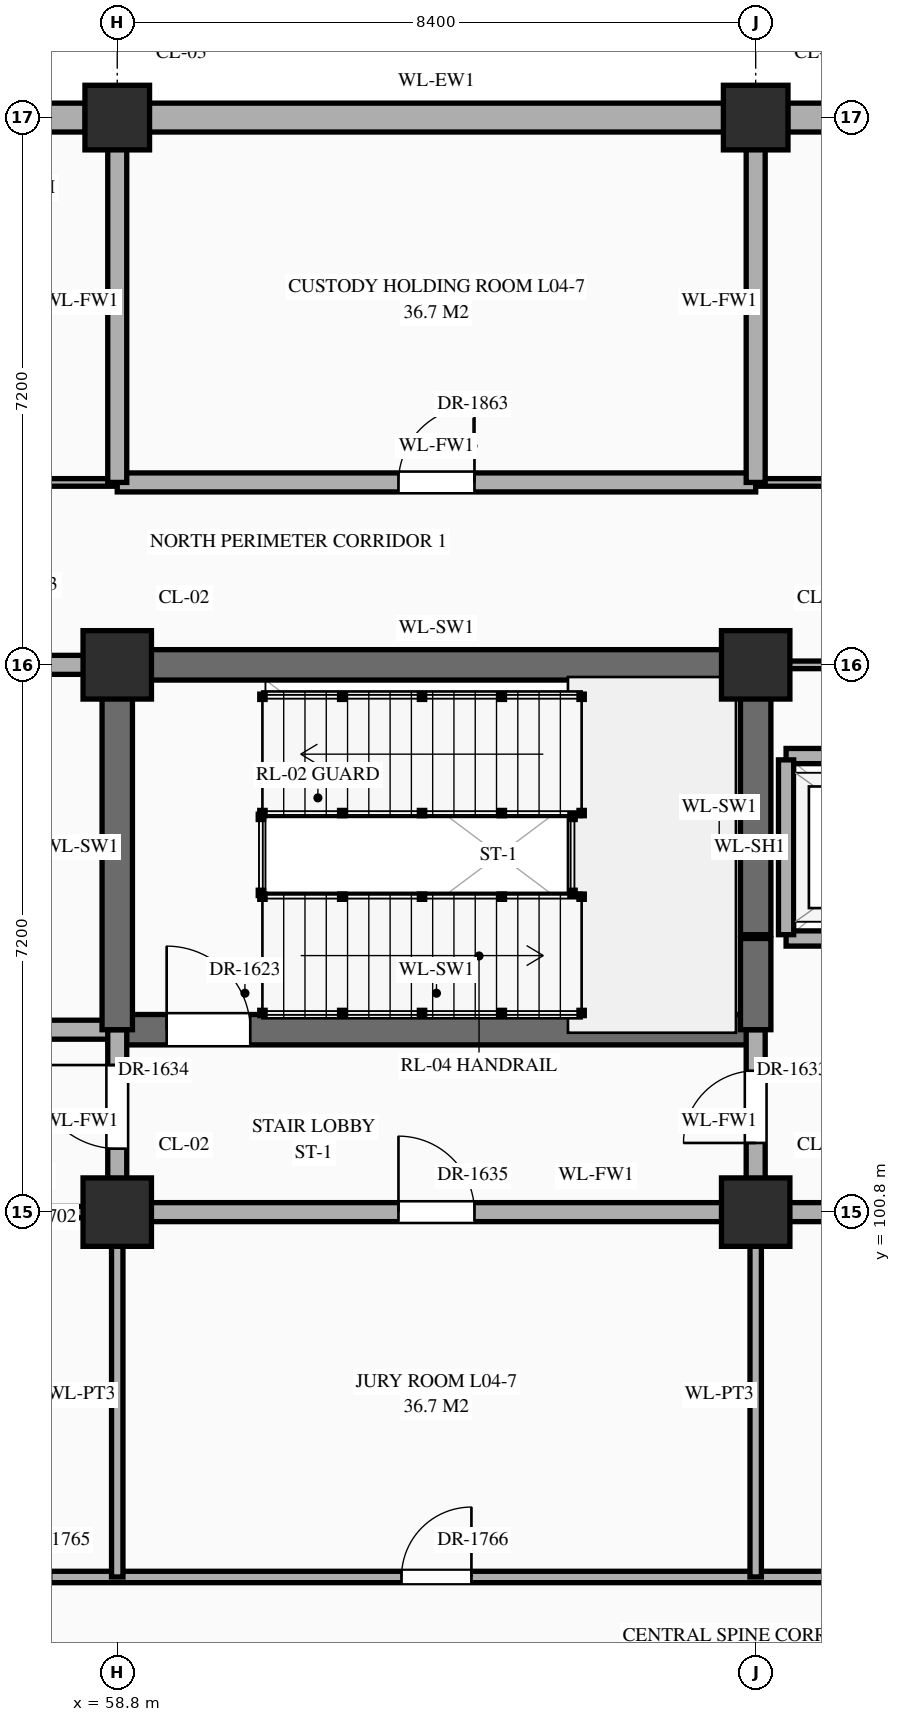
"""IFC4 building model, lengths in metres.
Left out: names, types, materials, properties, quantities, classifications, styles, units other than length and angle.
Written with IfcOpenShell. Run it as: python <this file> out.ifc"""

import sys

from ifc_helpers import new_model, si_unit, direction, frame, frame_2d, origin, origin_2d, place, context, subcontext, project, spatial, rectangle, extrude, element, fill, save


model = new_model("IFC4")
c1 = context("Model", 3, precision=1e-05, world=origin(), true_north=direction((0.0, 1.0)))
c2 = subcontext(c1, "Body", "Model", "MODEL_VIEW")
j1 = project(units=[si_unit("LENGTHUNIT", "METRE"), si_unit("PLANEANGLEUNIT", "RADIAN")], contexts=[c1])
p1 = place(None, origin())
s1 = spatial("IfcSite", under=j1, at=p1, CompositionType="ELEMENT")
p2 = place(p1, origin())
s2 = spatial("IfcBuilding", under=s1, at=p2, CompositionType="ELEMENT")
p3 = place(p2, frame((0.0, 0.0, 16.2)))
s3 = spatial("IfcBuildingStorey", under=s2, at=p3, CompositionType="ELEMENT", Elevation=16.2)
for number, where, z_axis, x_axis in (
    (1, (58.8, 100.8, 0.0), (0.0, 0.0, 1.0), (1.0, 0.0, 0.0)),
    (2, (58.8, 108.0, 0.0), (0.0, 0.0, 1.0), (1.0, 0.0, 0.0)),
):
    element("IfcColumn", number, at=place(p3, frame(where, z_axis=z_axis, x_axis=x_axis)), inside=s3, PredefinedType="COLUMN", context=c2, shape_type="SweptSolid", body=[
        extrude(rectangle(XDim=0.9, YDim=0.9, at=origin_2d()), origin(), (0.0, 0.0, 1.0), 5.4),
    ])
p4 = place(p3, frame((58.8, 115.2, 0.0), z_axis=(0.0, 0.0, 1.0), x_axis=(1.0, 0.0, 0.0)))
e3 = element("IfcColumn", 3, at=p4, inside=s3, PredefinedType="COLUMN", context=c2, shape_type="SweptSolid", body=[
    extrude(rectangle(XDim=0.85, YDim=0.85, at=origin_2d()), origin(), (0.0, 0.0, 1.0), 5.4),
])
for number, where, z_axis, x_axis in (
    (4, (67.2, 100.8, 0.0), (0.0, 0.0, 1.0), (1.0, 0.0, 0.0)),
    (5, (67.2, 108.0, 0.0), (0.0, 0.0, 1.0), (1.0, 0.0, 0.0)),
):
    element("IfcColumn", number, at=place(p3, frame(where, z_axis=z_axis, x_axis=x_axis)), inside=s3, PredefinedType="COLUMN", context=c2, shape_type="SweptSolid", body=[
        extrude(rectangle(XDim=0.9, YDim=0.9, at=origin_2d()), origin(), (0.0, 0.0, 1.0), 5.4),
    ])
p5 = place(p3, frame((67.2, 115.2, 0.0), z_axis=(0.0, 0.0, 1.0), x_axis=(1.0, 0.0, 0.0)))
e6 = element("IfcColumn", 6, at=p5, inside=s3, PredefinedType="COLUMN", context=c2, shape_type="SweptSolid", body=[
    extrude(rectangle(XDim=0.85, YDim=0.85, at=origin_2d()), origin(), (0.0, 0.0, 1.0), 5.4),
])
p6 = place(p3, frame((50.82, 115.2, 0.0), z_axis=(0.0, 0.0, 1.0), x_axis=(1.0, 0.0, 0.0)))
e7 = element("IfcWall", 7, at=p6, inside=s3, PredefinedType="STANDARD", context=c2, shape_type="SweptSolid", body=[
    extrude(rectangle(XDim=7.56, YDim=0.38, at=frame_2d((3.78, 0.0))), origin(), (0.0, 0.0, 1.0), 4.47),
])
p7 = place(p3, frame((59.22, 115.2, 0.0), z_axis=(0.0, 0.0, 1.0), x_axis=(1.0, 0.0, 0.0)))
e8 = element("IfcWall", 8, at=p7, inside=s3, PredefinedType="STANDARD", context=c2, shape_type="SweptSolid", body=[
    extrude(rectangle(XDim=7.56, YDim=0.38, at=frame_2d((3.78, 0.0))), origin(), (0.0, 0.0, 1.0), 4.47),
])
p8 = place(p3, frame((67.62, 115.2, 0.0), z_axis=(0.0, 0.0, 1.0), x_axis=(1.0, 0.0, 0.0)))
e9 = element("IfcWall", 9, at=p8, inside=s3, PredefinedType="STANDARD", context=c2, shape_type="SweptSolid", body=[
    extrude(rectangle(XDim=7.56, YDim=0.38, at=frame_2d((3.78, 0.0))), origin(), (0.0, 0.0, 1.0), 4.47),
])
p9 = place(p3, frame((56.2, 96.0, 0.0), z_axis=(0.0, 0.0, 1.0), x_axis=(1.0, 0.0, 0.0)))
e10 = element("IfcWall", 10, at=p9, inside=s3, PredefinedType="STANDARD", context=c2, shape_type="SweptSolid", body=[
    extrude(rectangle(XDim=27.8, YDim=0.15, at=frame_2d((13.9, 0.0))), origin(), (0.0, 0.0, 1.0), 5.12),
])
p10 = place(p9, frame((0.87, 0.0, 0.0)))
e11 = element("IfcOpeningElement", 11, at=p10, cuts=e10, PredefinedType="OPENING", context=c2, shape_type="SweptSolid", body=[
    extrude(rectangle(XDim=0.86, YDim=2.1, at=frame_2d((0.43, 1.05))), frame((0.0, 0.087, 0.0), z_axis=(0.0, -1.0, 0.0), x_axis=(1.0, 0.0, 0.0)), (0.0, 0.0, 1.0), 0.174),
])
p11 = place(p9, frame((6.34, 0.0, 0.0)))
e12 = element("IfcOpeningElement", 12, at=p11, cuts=e10, PredefinedType="OPENING", context=c2, shape_type="SweptSolid", body=[
    extrude(rectangle(XDim=0.92, YDim=2.15, at=frame_2d((0.46, 1.075))), frame((0.0, 0.087, 0.0), z_axis=(0.0, -1.0, 0.0), x_axis=(1.0, 0.0, 0.0)), (0.0, 0.0, 1.0), 0.174),
])
p12 = place(p9, frame((14.72, 0.0, 0.0)))
e13 = element("IfcOpeningElement", 13, at=p12, cuts=e10, PredefinedType="OPENING", context=c2, shape_type="SweptSolid", body=[
    extrude(rectangle(XDim=0.96, YDim=2.2, at=frame_2d((0.48, 1.1))), frame((0.0, 0.087, 0.0), z_axis=(0.0, -1.0, 0.0), x_axis=(1.0, 0.0, 0.0)), (0.0, 0.0, 1.0), 0.174),
])
p13 = place(p9, frame((23.1, 0.0, 0.0)))
e14 = element("IfcOpeningElement", 14, at=p13, cuts=e10, PredefinedType="OPENING", context=c2, shape_type="SweptSolid", body=[
    extrude(rectangle(XDim=1.0, YDim=2.25, at=frame_2d((0.5, 1.125))), frame((0.0, 0.087, 0.0), z_axis=(0.0, -1.0, 0.0), x_axis=(1.0, 0.0, 0.0)), (0.0, 0.0, 1.0), 0.174),
])
p14 = place(p3, frame((56.2, 100.8, 0.0), z_axis=(0.0, 0.0, 1.0), x_axis=(1.0, 0.0, 0.0)))
e15 = element("IfcWall", 15, at=p14, inside=s3, PredefinedType="STANDARD", context=c2, shape_type="SweptSolid", body=[
    extrude(rectangle(XDim=2.6, YDim=0.15, at=frame_2d((1.3, 0.0))), origin(), (0.0, 0.0, 1.0), 4.27),
])
p15 = place(p14, frame((0.575, 0.0, 0.0)))
e16 = element("IfcOpeningElement", 16, at=p15, cuts=e15, PredefinedType="OPENING", context=c2, shape_type="SweptSolid", body=[
    extrude(rectangle(XDim=1.08, YDim=2.25, at=frame_2d((0.54, 1.125))), frame((0.0, 0.087, 0.0), z_axis=(0.0, -1.0, 0.0), x_axis=(1.0, 0.0, 0.0)), (0.0, 0.0, 1.0), 0.174),
])
p16 = place(p3, frame((58.8, 100.8, 0.0), z_axis=(0.0, 0.0, 1.0), x_axis=(1.0, 0.0, 0.0)))
e17 = element("IfcWall", 17, at=p16, inside=s3, PredefinedType="STANDARD", context=c2, shape_type="SweptSolid", body=[
    extrude(rectangle(XDim=12.6, YDim=0.25, at=frame_2d((6.3, 0.0))), origin(), (0.0, 0.0, 1.0), 4.27),
])
p17 = place(p16, frame((3.7, 0.0, 0.0)))
e18 = element("IfcOpeningElement", 18, at=p17, cuts=e17, PredefinedType="OPENING", context=c2, shape_type="SweptSolid", body=[
    extrude(rectangle(XDim=1.0, YDim=2.2, at=frame_2d((0.5, 1.1))), frame((0.0, 0.137, 0.0), z_axis=(0.0, -1.0, 0.0), x_axis=(1.0, 0.0, 0.0)), (0.0, 0.0, 1.0), 0.274),
])
p18 = place(p3, frame((54.6, 103.2, 0.0), z_axis=(0.0, 0.0, 1.0), x_axis=(1.0, 0.0, 0.0)))
e19 = element("IfcWall", 19, at=p18, inside=s3, PredefinedType="STANDARD", context=c2, shape_type="SweptSolid", body=[
    extrude(rectangle(XDim=4.2, YDim=0.25, at=frame_2d((2.1, 0.0))), origin(), (0.0, 0.0, 1.0), 5.12),
])
p19 = place(p18, frame((1.55, 0.0, 0.0)))
e20 = element("IfcOpeningElement", 20, at=p19, cuts=e19, PredefinedType="OPENING", context=c2, shape_type="SweptSolid", body=[
    extrude(rectangle(XDim=1.1, YDim=2.2, at=frame_2d((0.55, 1.1))), frame((0.0, 0.137, 0.0), z_axis=(0.0, -1.0, 0.0), x_axis=(1.0, 0.0, 0.0)), (0.0, 0.0, 1.0), 0.274),
])
p20 = place(p3, frame((58.8, 103.2, 0.0), z_axis=(0.0, 0.0, 1.0), x_axis=(1.0, 0.0, 0.0)))
e21 = element("IfcWall", 21, at=p20, inside=s3, PredefinedType="SHEAR", context=c2, shape_type="SweptSolid", body=[
    extrude(rectangle(XDim=8.4, YDim=0.4, at=frame_2d((4.2, 0.0))), origin(), (0.0, 0.0, 1.0), 5.12),
])
p21 = place(p20, frame((0.65, 0.0, 0.0)))
e22 = element("IfcOpeningElement", 22, at=p21, cuts=e21, PredefinedType="OPENING", context=c2, shape_type="SweptSolid", body=[
    extrude(rectangle(XDim=1.1, YDim=2.2, at=frame_2d((0.55, 1.1))), frame((0.0, 0.212, 0.0), z_axis=(0.0, -1.0, 0.0), x_axis=(1.0, 0.0, 0.0)), (0.0, 0.0, 1.0), 0.424),
])
p22 = place(p3, frame((67.6, 104.4, 0.0), z_axis=(0.0, 0.0, 1.0), x_axis=(1.0, 0.0, 0.0)))
e23 = element("IfcWall", 23, at=p22, inside=s3, PredefinedType="STANDARD", context=c2, shape_type="SweptSolid", body=[
    extrude(rectangle(XDim=3.0, YDim=0.2, at=frame_2d((1.5, 0.0))), origin(), (0.0, 0.0, 1.0), 5.12),
])
p23 = place(p22, frame((0.9, 0.0, 0.0)))
e24 = element("IfcOpeningElement", 24, at=p23, cuts=e23, PredefinedType="OPENING", context=c2, shape_type="SweptSolid", body=[
    extrude(rectangle(XDim=1.2, YDim=2.15, at=frame_2d((0.6, 1.075))), frame((0.0, 0.112, 0.0), z_axis=(0.0, -1.0, 0.0), x_axis=(1.0, 0.0, 0.0)), (0.0, 0.0, 1.0), 0.224),
])
p24 = place(p3, frame((67.6, 106.8, 0.0), z_axis=(0.0, 0.0, 1.0), x_axis=(1.0, 0.0, 0.0)))
e25 = element("IfcWall", 25, at=p24, inside=s3, PredefinedType="STANDARD", context=c2, shape_type="SweptSolid", body=[
    extrude(rectangle(XDim=3.0, YDim=0.2, at=frame_2d((1.5, 0.0))), origin(), (0.0, 0.0, 1.0), 5.12),
])
p25 = place(p3, frame((54.6, 108.0, 0.0), z_axis=(0.0, 0.0, 1.0), x_axis=(1.0, 0.0, 0.0)))
e26 = element("IfcWall", 26, at=p25, inside=s3, PredefinedType="STANDARD", context=c2, shape_type="SweptSolid", body=[
    extrude(rectangle(XDim=4.2, YDim=0.25, at=frame_2d((2.1, 0.0))), origin(), (0.0, 0.0, 1.0), 4.27),
])
p26 = place(p25, frame((1.365, 0.0, 0.0)))
e27 = element("IfcOpeningElement", 27, at=p26, cuts=e26, PredefinedType="OPENING", context=c2, shape_type="SweptSolid", body=[
    extrude(rectangle(XDim=1.1, YDim=2.2, at=frame_2d((0.55, 1.1))), frame((0.0, 0.137, 0.0), z_axis=(0.0, -1.0, 0.0), x_axis=(1.0, 0.0, 0.0)), (0.0, 0.0, 1.0), 0.274),
])
p27 = place(p3, frame((58.8, 108.0, 0.0), z_axis=(0.0, 0.0, 1.0), x_axis=(1.0, 0.0, 0.0)))
e28 = element("IfcWall", 28, at=p27, inside=s3, PredefinedType="SHEAR", context=c2, shape_type="SweptSolid", body=[
    extrude(rectangle(XDim=8.4, YDim=0.4, at=frame_2d((4.2, 0.0))), origin(), (0.0, 0.0, 1.0), 5.12),
])
p28 = place(p3, frame((67.25, 108.0, 0.0), z_axis=(0.0, 0.0, 1.0), x_axis=(1.0, 0.0, 0.0)))
e29 = element("IfcWall", 29, at=p28, inside=s3, PredefinedType="STANDARD", context=c2, shape_type="SweptSolid", body=[
    extrude(rectangle(XDim=4.1, YDim=0.1, at=frame_2d((2.05, 0.0))), origin(), (0.0, 0.0, 1.0), 4.27),
])
p29 = place(p3, frame((50.44, 110.4, 0.0), z_axis=(0.0, 0.0, 1.0), x_axis=(1.0, 0.0, 0.0)))
e30 = element("IfcWall", 30, at=p29, inside=s3, PredefinedType="STANDARD", context=c2, shape_type="SweptSolid", body=[
    extrude(rectangle(XDim=8.36, YDim=0.1, at=frame_2d((4.18, 0.0))), origin(), (0.0, 0.0, 1.0), 5.12),
])
p30 = place(p29, frame((3.69, 0.0, 0.0)))
e31 = element("IfcOpeningElement", 31, at=p30, cuts=e30, PredefinedType="OPENING", context=c2, shape_type="SweptSolid", body=[
    extrude(rectangle(XDim=0.98, YDim=2.35, at=frame_2d((0.49, 1.175))), frame((0.0, 0.062, 0.0), z_axis=(0.0, -1.0, 0.0), x_axis=(1.0, 0.0, 0.0)), (0.0, 0.0, 1.0), 0.124),
])
p31 = place(p3, frame((58.8, 110.4, 0.0), z_axis=(0.0, 0.0, 1.0), x_axis=(1.0, 0.0, 0.0)))
e32 = element("IfcWall", 32, at=p31, inside=s3, PredefinedType="STANDARD", context=c2, shape_type="SweptSolid", body=[
    extrude(rectangle(XDim=8.4, YDim=0.25, at=frame_2d((4.2, 0.0))), origin(), (0.0, 0.0, 1.0), 5.12),
])
p32 = place(p31, frame((3.7, 0.0, 0.0)))
e33 = element("IfcOpeningElement", 33, at=p32, cuts=e32, PredefinedType="OPENING", context=c2, shape_type="SweptSolid", body=[
    extrude(rectangle(XDim=1.0, YDim=2.2, at=frame_2d((0.5, 1.1))), frame((0.0, 0.137, 0.0), z_axis=(0.0, -1.0, 0.0), x_axis=(1.0, 0.0, 0.0)), (0.0, 0.0, 1.0), 0.274),
])
p33 = place(p3, frame((67.2, 110.4, 0.0), z_axis=(0.0, 0.0, 1.0), x_axis=(1.0, 0.0, 0.0)))
e34 = element("IfcWall", 34, at=p33, inside=s3, PredefinedType="STANDARD", context=c2, shape_type="SweptSolid", body=[
    extrude(rectangle(XDim=33.6, YDim=0.1, at=frame_2d((16.8, 0.0))), origin(), (0.0, 0.0, 1.0), 5.12),
])
p34 = place(p33, frame((3.67, 0.0, 0.0)))
e35 = element("IfcOpeningElement", 35, at=p34, cuts=e34, PredefinedType="OPENING", context=c2, shape_type="SweptSolid", body=[
    extrude(rectangle(XDim=1.06, YDim=2.4, at=frame_2d((0.53, 1.2))), frame((0.0, 0.062, 0.0), z_axis=(0.0, -1.0, 0.0), x_axis=(1.0, 0.0, 0.0)), (0.0, 0.0, 1.0), 0.124),
])
p35 = place(p33, frame((12.03, 0.0, 0.0)))
e36 = element("IfcOpeningElement", 36, at=p35, cuts=e34, PredefinedType="OPENING", context=c2, shape_type="SweptSolid", body=[
    extrude(rectangle(XDim=1.14, YDim=2.4, at=frame_2d((0.57, 1.2))), frame((0.0, 0.062, 0.0), z_axis=(0.0, -1.0, 0.0), x_axis=(1.0, 0.0, 0.0)), (0.0, 0.0, 1.0), 0.124),
])
p36 = place(p33, frame((20.55, 0.0, 0.0)))
e37 = element("IfcOpeningElement", 37, at=p36, cuts=e34, PredefinedType="OPENING", context=c2, shape_type="SweptSolid", body=[
    extrude(rectangle(XDim=0.9, YDim=2.15, at=frame_2d((0.45, 1.075))), frame((0.0, 0.062, 0.0), z_axis=(0.0, -1.0, 0.0), x_axis=(1.0, 0.0, 0.0)), (0.0, 0.0, 1.0), 0.124),
])
p37 = place(p33, frame((28.97, 0.0, 0.0)))
e38 = element("IfcOpeningElement", 38, at=p37, cuts=e34, PredefinedType="OPENING", context=c2, shape_type="SweptSolid", body=[
    extrude(rectangle(XDim=0.86, YDim=2.1, at=frame_2d((0.43, 1.05))), frame((0.0, 0.062, 0.0), z_axis=(0.0, -1.0, 0.0), x_axis=(1.0, 0.0, 0.0)), (0.0, 0.0, 1.0), 0.124),
])
p38 = place(p3, frame((58.8, 96.0, 0.0), z_axis=(0.0, 0.0, 1.0), x_axis=(0.0, 1.0, 0.0)))
e39 = element("IfcWall", 39, at=p38, inside=s3, PredefinedType="STANDARD", context=c2, shape_type="SweptSolid", body=[
    extrude(rectangle(XDim=4.8, YDim=0.15, at=frame_2d((2.4, 0.0))), origin(), (0.0, 0.0, 1.0), 4.37),
])
p39 = place(p3, frame((58.8, 100.8, 0.0), z_axis=(0.0, 0.0, 1.0), x_axis=(0.0, 1.0, 0.0)))
e40 = element("IfcWall", 40, at=p39, inside=s3, PredefinedType="STANDARD", context=c2, shape_type="SweptSolid", body=[
    extrude(rectangle(XDim=2.4, YDim=0.25, at=frame_2d((1.2, 0.0))), origin(), (0.0, 0.0, 1.0), 4.37),
])
p40 = place(p39, frame((0.835, 0.0, 0.0)))
e41 = element("IfcOpeningElement", 41, at=p40, cuts=e40, PredefinedType="OPENING", context=c2, shape_type="SweptSolid", body=[
    extrude(rectangle(XDim=1.1, YDim=2.2, at=frame_2d((0.55, 1.1))), frame((0.0, 0.137, 0.0), z_axis=(0.0, -1.0, 0.0), x_axis=(1.0, 0.0, 0.0)), (0.0, 0.0, 1.0), 0.274),
])
p41 = place(p3, frame((58.8, 103.2, 0.0), z_axis=(0.0, 0.0, 1.0), x_axis=(0.0, 1.0, 0.0)))
e42 = element("IfcWall", 42, at=p41, inside=s3, PredefinedType="SHEAR", context=c2, shape_type="SweptSolid", body=[
    extrude(rectangle(XDim=4.8, YDim=0.4, at=frame_2d((2.4, 0.0))), origin(), (0.0, 0.0, 1.0), 5.12),
])
p42 = place(p3, frame((58.8, 110.4, 0.0), z_axis=(0.0, 0.0, 1.0), x_axis=(0.0, 1.0, 0.0)))
e43 = element("IfcWall", 43, at=p42, inside=s3, PredefinedType="STANDARD", context=c2, shape_type="SweptSolid", body=[
    extrude(rectangle(XDim=4.76, YDim=0.25, at=frame_2d((2.38, 0.0))), origin(), (0.0, 0.0, 1.0), 4.37),
])
p43 = place(p3, frame((67.2, 96.0, 0.0), z_axis=(0.0, 0.0, 1.0), x_axis=(0.0, 1.0, 0.0)))
e44 = element("IfcWall", 44, at=p43, inside=s3, PredefinedType="STANDARD", context=c2, shape_type="SweptSolid", body=[
    extrude(rectangle(XDim=4.8, YDim=0.15, at=frame_2d((2.4, 0.0))), origin(), (0.0, 0.0, 1.0), 4.37),
])
p44 = place(p3, frame((67.2, 100.8, 0.0), z_axis=(0.0, 0.0, 1.0), x_axis=(0.0, 1.0, 0.0)))
e45 = element("IfcWall", 45, at=p44, inside=s3, PredefinedType="STANDARD", context=c2, shape_type="SweptSolid", body=[
    extrude(rectangle(XDim=2.4, YDim=0.25, at=frame_2d((1.2, 0.0))), origin(), (0.0, 0.0, 1.0), 4.37),
])
p45 = place(p44, frame((0.91, 0.0, 0.0)))
e46 = element("IfcOpeningElement", 46, at=p45, cuts=e45, PredefinedType="OPENING", context=c2, shape_type="SweptSolid", body=[
    extrude(rectangle(XDim=0.95, YDim=2.15, at=frame_2d((0.475, 1.075))), frame((0.0, 0.137, 0.0), z_axis=(0.0, -1.0, 0.0), x_axis=(1.0, 0.0, 0.0)), (0.0, 0.0, 1.0), 0.274),
])
p46 = place(p3, frame((67.2, 103.2, 0.0), z_axis=(0.0, 0.0, 1.0), x_axis=(0.0, 1.0, 0.0)))
e47 = element("IfcWall", 47, at=p46, inside=s3, PredefinedType="SHEAR", context=c2, shape_type="SweptSolid", body=[
    extrude(rectangle(XDim=1.2, YDim=0.4, at=frame_2d((0.6, 0.0))), origin(), (0.0, 0.0, 1.0), 5.12),
])
p47 = place(p3, frame((67.2, 104.45, 0.0), z_axis=(0.0, 0.0, 1.0), x_axis=(0.0, 1.0, 0.0)))
e48 = element("IfcWall", 48, at=p47, inside=s3, PredefinedType="SHEAR", context=c2, shape_type="SweptSolid", body=[
    extrude(rectangle(XDim=3.5, YDim=0.4, at=frame_2d((1.75, 0.0))), origin(), (0.0, 0.0, 1.0), 5.12),
])
p48 = place(p3, frame((67.2, 110.4, 0.0), z_axis=(0.0, 0.0, 1.0), x_axis=(0.0, 1.0, 0.0)))
e49 = element("IfcWall", 49, at=p48, inside=s3, PredefinedType="STANDARD", context=c2, shape_type="SweptSolid", body=[
    extrude(rectangle(XDim=4.76, YDim=0.25, at=frame_2d((2.38, 0.0))), origin(), (0.0, 0.0, 1.0), 4.37),
])
p49 = place(p3, frame((67.6, 104.45, 0.0), z_axis=(0.0, 0.0, 1.0), x_axis=(0.0, 1.0, 0.0)))
e50 = element("IfcWall", 50, at=p49, inside=s3, PredefinedType="STANDARD", context=c2, shape_type="SweptSolid", body=[
    extrude(rectangle(XDim=2.3, YDim=0.2, at=frame_2d((1.15, 0.0))), origin(), (0.0, 0.0, 1.0), 5.12),
])
p50 = place(p21, origin())
e51 = element("IfcDoor", 51, at=p50, inside=s3, OperationType="SINGLE_SWING_LEFT", PredefinedType="DOOR", context=c2, shape_type="SweptSolid", body=[
    extrude(rectangle(XDim=1.1, YDim=2.2, at=frame_2d((0.55, 1.1))), frame((0.0, 0.025, 0.0), z_axis=(0.0, -1.0, 0.0), x_axis=(1.0, 0.0, 0.0)), (0.0, 0.0, 1.0), 0.05),
])
fill(e22, e51)
p51 = place(p45, origin())
e52 = element("IfcDoor", 52, at=p51, inside=s3, OperationType="SINGLE_SWING_LEFT", PredefinedType="DOOR", context=c2, shape_type="SweptSolid", body=[
    extrude(rectangle(XDim=0.95, YDim=2.15, at=frame_2d((0.475, 1.075))), frame((0.0, 0.025, 0.0), z_axis=(0.0, -1.0, 0.0), x_axis=(1.0, 0.0, 0.0)), (0.0, 0.0, 1.0), 0.05),
])
fill(e46, e52)
p52 = place(p40, origin())
e53 = element("IfcDoor", 53, at=p52, inside=s3, OperationType="SINGLE_SWING_RIGHT", PredefinedType="DOOR", context=c2, shape_type="SweptSolid", body=[
    extrude(rectangle(XDim=1.1, YDim=2.2, at=frame_2d((0.55, 1.1))), frame((0.0, 0.025, 0.0), z_axis=(0.0, -1.0, 0.0), x_axis=(1.0, 0.0, 0.0)), (0.0, 0.0, 1.0), 0.05),
])
fill(e41, e53)
p53 = place(p17, origin())
e54 = element("IfcDoor", 54, at=p53, inside=s3, OperationType="SINGLE_SWING_LEFT", PredefinedType="DOOR", context=c2, shape_type="SweptSolid", body=[
    extrude(rectangle(XDim=1.0, YDim=2.2, at=frame_2d((0.5, 1.1))), frame((0.0, 0.025, 0.0), z_axis=(0.0, -1.0, 0.0), x_axis=(1.0, 0.0, 0.0)), (0.0, 0.0, 1.0), 0.05),
])
fill(e18, e54)
p54 = place(p11, origin())
e55 = element("IfcDoor", 55, at=p54, inside=s3, OperationType="SINGLE_SWING_RIGHT", PredefinedType="DOOR", context=c2, shape_type="SweptSolid", body=[
    extrude(rectangle(XDim=0.92, YDim=2.15, at=frame_2d((0.46, 1.075))), frame((0.0, 0.025, 0.0), z_axis=(0.0, -1.0, 0.0), x_axis=(1.0, 0.0, 0.0)), (0.0, 0.0, 1.0), 0.05),
])
fill(e12, e55)
p55 = place(p32, origin())
e56 = element("IfcDoor", 56, at=p55, inside=s3, OperationType="SINGLE_SWING_RIGHT", PredefinedType="DOOR", context=c2, shape_type="SweptSolid", body=[
    extrude(rectangle(XDim=1.0, YDim=2.2, at=frame_2d((0.5, 1.1))), frame((0.0, 0.025, 0.0), z_axis=(0.0, -1.0, 0.0), x_axis=(1.0, 0.0, 0.0)), (0.0, 0.0, 1.0), 0.05),
])
fill(e33, e56)
save(model, sys.argv[1])
